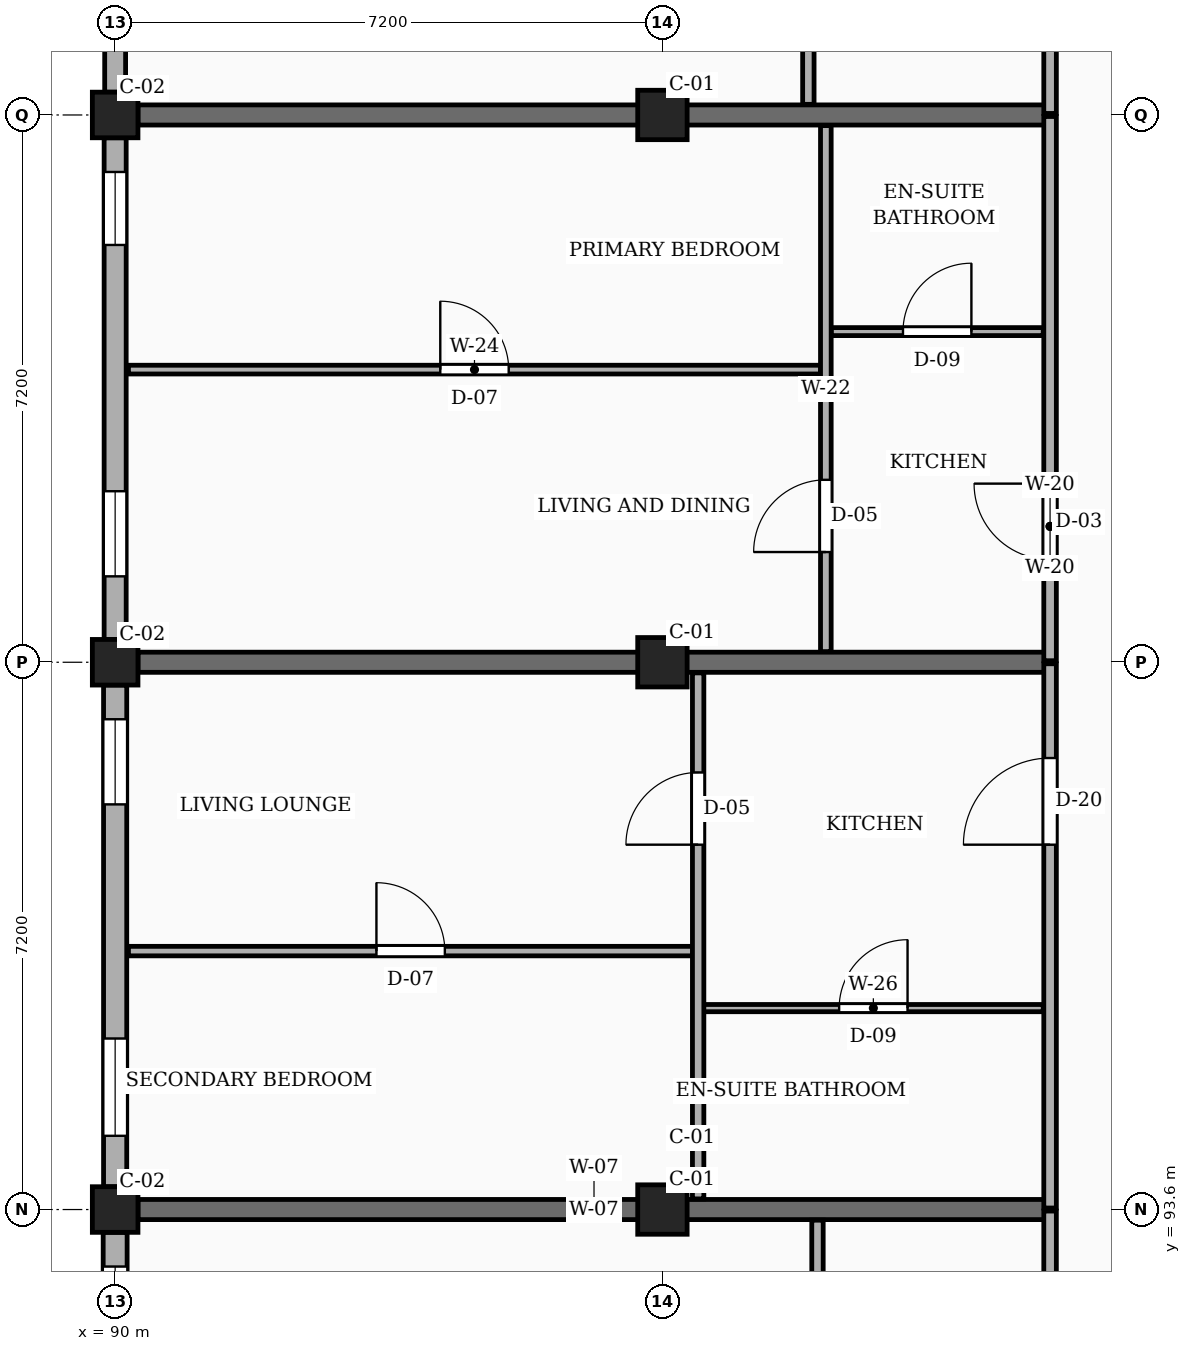
"""IFC4 building model, lengths in metres.
Left out: names, types, materials, properties, quantities, classifications, styles, units other than length and angle.
Written with IfcOpenShell. Run it as: python <this file> out.ifc"""

import sys

from ifc_helpers import new_model, si_unit, direction, frame, frame_2d, origin, origin_2d, place, context, subcontext, project, spatial, rectangle, extrude, element, fill, save


model = new_model("IFC4")
c1 = context("Model", 3, precision=1e-05, world=origin(), true_north=direction((0.0, 1.0)))
c2 = subcontext(c1, "Body", "Model", "MODEL_VIEW")
j1 = project(units=[si_unit("LENGTHUNIT", "METRE"), si_unit("PLANEANGLEUNIT", "RADIAN")], contexts=[c1])
p1 = place(None, origin())
s1 = spatial("IfcSite", under=j1, at=p1, CompositionType="ELEMENT")
p2 = place(p1, origin())
s2 = spatial("IfcBuilding", under=s1, at=p2, CompositionType="ELEMENT")
p3 = place(p2, frame((0.0, 0.0, 4.5)))
s3 = spatial("IfcBuildingStorey", under=s2, at=p3, CompositionType="ELEMENT", Elevation=4.5)
for number, where, z_axis, x_axis in (
    (1, (90.0, 93.6, 0.0), (0.0, 0.0, 1.0), (1.0, 0.0, 0.0)),
    (2, (90.0, 100.8, 0.0), (0.0, 0.0, 1.0), (1.0, 0.0, 0.0)),
    (3, (90.0, 108.0, 0.0), (0.0, 0.0, 1.0), (1.0, 0.0, 0.0)),
):
    element("IfcColumn", number, at=place(p3, frame(where, z_axis=z_axis, x_axis=x_axis)), inside=s3, PredefinedType="COLUMN", context=c2, shape_type="SweptSolid", body=[
        extrude(rectangle(XDim=0.6, YDim=0.6, at=origin_2d()), origin(), (0.0, 0.0, 1.0), 3.15),
    ])
for number, where, z_axis, x_axis in (
    (4, (97.2, 93.6, 0.0), (0.0, 0.0, 1.0), (1.0, 0.0, 0.0)),
    (5, (97.2, 100.8, 0.0), (0.0, 0.0, 1.0), (1.0, 0.0, 0.0)),
    (6, (97.2, 108.0, 0.0), (0.0, 0.0, 1.0), (1.0, 0.0, 0.0)),
):
    element("IfcColumn", number, at=place(p3, frame(where, z_axis=z_axis, x_axis=x_axis)), inside=s3, PredefinedType="COLUMN", context=c2, shape_type="SweptSolid", body=[
        extrude(rectangle(XDim=0.65, YDim=0.65, at=origin_2d()), origin(), (0.0, 0.0, 1.0), 3.15),
    ])
for number, where, z_axis, x_axis in (
    (7, (90.3, 93.6, 0.0), (0.0, 0.0, 1.0), (1.0, 0.0, 0.0)),
    (8, (90.3, 100.8, 0.0), (0.0, 0.0, 1.0), (1.0, 0.0, 0.0)),
    (9, (90.3, 108.0, 0.0), (0.0, 0.0, 1.0), (1.0, 0.0, 0.0)),
):
    element("IfcWall", number, at=place(p3, frame(where, z_axis=z_axis, x_axis=x_axis)), inside=s3, PredefinedType="SOLIDWALL", context=c2, shape_type="SweptSolid", body=[
        extrude(rectangle(XDim=12.0, YDim=0.265, at=frame_2d((6.0, 0.0))), origin(), (0.0, 0.0, 1.0), 2.19),
    ])
p4 = place(p3, frame((90.0, 114.9, 0.0), z_axis=(0.0, 0.0, 1.0), x_axis=(0.0, -1.0, 0.0)))
e10 = element("IfcWall", 10, at=p4, inside=s3, PredefinedType="SOLIDWALL", context=c2, shape_type="SweptSolid", body=[
    extrude(rectangle(XDim=6.6, YDim=0.275, at=frame_2d((3.3, 0.0))), origin(), (0.0, 0.0, 1.0), 2.46),
])
p5 = place(p4, frame((0.45, 0.0, 0.78)))
e11 = element("IfcOpeningElement", 11, at=p5, cuts=e10, PredefinedType="OPENING", context=c2, shape_type="SweptSolid", body=[
    extrude(rectangle(XDim=1.4, YDim=1.15, at=frame_2d((0.7, 0.575))), frame((0.0, 0.147, 0.0), z_axis=(0.0, -1.0, 0.0), x_axis=(1.0, 0.0, 0.0)), (0.0, 0.0, 1.0), 0.295),
])
p6 = place(p4, frame((4.65, 0.0, 0.78)))
e12 = element("IfcOpeningElement", 12, at=p6, cuts=e10, PredefinedType="OPENING", context=c2, shape_type="SweptSolid", body=[
    extrude(rectangle(XDim=0.96, YDim=1.26, at=frame_2d((0.48, 0.63))), frame((0.0, 0.147, 0.0), z_axis=(0.0, -1.0, 0.0), x_axis=(1.0, 0.0, 0.0)), (0.0, 0.0, 1.0), 0.295),
])
p7 = place(p3, frame((90.0, 107.7, 0.0), z_axis=(0.0, 0.0, 1.0), x_axis=(0.0, -1.0, 0.0)))
e13 = element("IfcWall", 13, at=p7, inside=s3, PredefinedType="SOLIDWALL", context=c2, shape_type="SweptSolid", body=[
    extrude(rectangle(XDim=6.6, YDim=0.29, at=frame_2d((3.3, 0.0))), origin(), (0.0, 0.0, 1.0), 2.46),
])
p8 = place(p7, frame((0.45, 0.0, 0.78)))
e14 = element("IfcOpeningElement", 14, at=p8, cuts=e13, PredefinedType="OPENING", context=c2, shape_type="SweptSolid", body=[
    extrude(rectangle(XDim=0.96, YDim=1.26, at=frame_2d((0.48, 0.63))), frame((0.0, 0.155, 0.0), z_axis=(0.0, -1.0, 0.0), x_axis=(1.0, 0.0, 0.0)), (0.0, 0.0, 1.0), 0.31),
])
p9 = place(p7, frame((4.65, 0.0, 0.78)))
e15 = element("IfcOpeningElement", 15, at=p9, cuts=e13, PredefinedType="OPENING", context=c2, shape_type="SweptSolid", body=[
    extrude(rectangle(XDim=1.12, YDim=1.26, at=frame_2d((0.56, 0.63))), frame((0.0, 0.155, 0.0), z_axis=(0.0, -1.0, 0.0), x_axis=(1.0, 0.0, 0.0)), (0.0, 0.0, 1.0), 0.31),
])
p10 = place(p3, frame((90.0, 100.5, 0.0), z_axis=(0.0, 0.0, 1.0), x_axis=(0.0, -1.0, 0.0)))
e16 = element("IfcWall", 16, at=p10, inside=s3, PredefinedType="SOLIDWALL", context=c2, shape_type="SweptSolid", body=[
    extrude(rectangle(XDim=6.6, YDim=0.305, at=frame_2d((3.3, 0.0))), origin(), (0.0, 0.0, 1.0), 2.46),
])
p11 = place(p10, frame((0.45, 0.0, 0.78)))
e17 = element("IfcOpeningElement", 17, at=p11, cuts=e16, PredefinedType="OPENING", context=c2, shape_type="SweptSolid", body=[
    extrude(rectangle(XDim=1.12, YDim=1.26, at=frame_2d((0.56, 0.63))), frame((0.0, 0.163, 0.0), z_axis=(0.0, -1.0, 0.0), x_axis=(1.0, 0.0, 0.0)), (0.0, 0.0, 1.0), 0.325),
])
p12 = place(p10, frame((4.65, 0.0, 0.78)))
e18 = element("IfcOpeningElement", 18, at=p12, cuts=e16, PredefinedType="OPENING", context=c2, shape_type="SweptSolid", body=[
    extrude(rectangle(XDim=1.28, YDim=1.26, at=frame_2d((0.64, 0.63))), frame((0.0, 0.163, 0.0), z_axis=(0.0, -1.0, 0.0), x_axis=(1.0, 0.0, 0.0)), (0.0, 0.0, 1.0), 0.325),
])
p13 = place(p3, frame((90.0, 93.3, 0.0), z_axis=(0.0, 0.0, 1.0), x_axis=(0.0, -1.0, 0.0)))
e19 = element("IfcWall", 19, at=p13, inside=s3, PredefinedType="SOLIDWALL", context=c2, shape_type="SweptSolid", body=[
    extrude(rectangle(XDim=6.6, YDim=0.315, at=frame_2d((3.3, 0.0))), origin(), (0.0, 0.0, 1.0), 2.46),
])
p14 = place(p13, frame((0.45, 0.0, 0.78)))
e20 = element("IfcOpeningElement", 20, at=p14, cuts=e19, PredefinedType="OPENING", context=c2, shape_type="SweptSolid", body=[
    extrude(rectangle(XDim=1.28, YDim=1.26, at=frame_2d((0.64, 0.63))), frame((0.0, 0.167, 0.0), z_axis=(0.0, -1.0, 0.0), x_axis=(1.0, 0.0, 0.0)), (0.0, 0.0, 1.0), 0.335),
])
p15 = place(p13, frame((4.65, 0.0, 0.78)))
e21 = element("IfcOpeningElement", 21, at=p15, cuts=e19, PredefinedType="OPENING", context=c2, shape_type="SweptSolid", body=[
    extrude(rectangle(XDim=1.44, YDim=1.26, at=frame_2d((0.72, 0.63))), frame((0.0, 0.167, 0.0), z_axis=(0.0, -1.0, 0.0), x_axis=(1.0, 0.0, 0.0)), (0.0, 0.0, 1.0), 0.335),
])
p16 = place(p3, frame((102.3, 86.575, 0.0), z_axis=(0.0, 0.0, 1.0), x_axis=(0.0, 1.0, 0.0)))
e22 = element("IfcWall", 22, at=p16, inside=s3, PredefinedType="PARTITIONING", context=c2, shape_type="SweptSolid", body=[
    extrude(rectangle(XDim=7.005, YDim=0.165, at=frame_2d((3.502, 0.0))), origin(), (0.0, 0.0, 1.0), 2.325),
])
p17 = place(p16, frame((4.625, 0.0, 0.0)))
e23 = element("IfcOpeningElement", 23, at=p17, cuts=e22, PredefinedType="OPENING", context=c2, shape_type="SweptSolid", body=[
    extrude(rectangle(XDim=0.94, YDim=2.12, at=frame_2d((0.47, 1.06))), frame((0.0, 0.093, 0.0), z_axis=(0.0, -1.0, 0.0), x_axis=(1.0, 0.0, 0.0)), (0.0, 0.0, 1.0), 0.185),
])
p18 = place(p3, frame((102.3, 93.62, 0.0), z_axis=(0.0, 0.0, 1.0), x_axis=(0.0, 1.0, 0.0)))
e24 = element("IfcWall", 24, at=p18, inside=s3, PredefinedType="PARTITIONING", context=c2, shape_type="SweptSolid", body=[
    extrude(rectangle(XDim=7.16, YDim=0.165, at=frame_2d((3.58, 0.0))), origin(), (0.0, 0.0, 1.0), 2.325),
])
p19 = place(p18, frame((4.78, 0.0, 0.0)))
e25 = element("IfcOpeningElement", 25, at=p19, cuts=e24, PredefinedType="OPENING", context=c2, shape_type="SweptSolid", body=[
    extrude(rectangle(XDim=1.14, YDim=2.18, at=frame_2d((0.57, 1.09))), frame((0.0, 0.093, 0.0), z_axis=(0.0, -1.0, 0.0), x_axis=(1.0, 0.0, 0.0)), (0.0, 0.0, 1.0), 0.185),
])
p20 = place(p3, frame((102.3, 100.82, 0.0), z_axis=(0.0, 0.0, 1.0), x_axis=(0.0, 1.0, 0.0)))
e26 = element("IfcWall", 26, at=p20, inside=s3, PredefinedType="PARTITIONING", context=c2, shape_type="SweptSolid", body=[
    extrude(rectangle(XDim=7.16, YDim=0.165, at=frame_2d((3.58, 0.0))), origin(), (0.0, 0.0, 1.0), 2.325),
])
p21 = place(p20, frame((1.33, 0.0, 0.0)))
e27 = element("IfcOpeningElement", 27, at=p21, cuts=e26, PredefinedType="OPENING", context=c2, shape_type="SweptSolid", body=[
    extrude(rectangle(XDim=1.0, YDim=2.15, at=frame_2d((0.5, 1.075))), frame((0.0, 0.093, 0.0), z_axis=(0.0, -1.0, 0.0), x_axis=(1.0, 0.0, 0.0)), (0.0, 0.0, 1.0), 0.185),
])
p22 = place(p3, frame((102.3, 108.02, 0.0), z_axis=(0.0, 0.0, 1.0), x_axis=(0.0, 1.0, 0.0)))
e28 = element("IfcWall", 28, at=p22, inside=s3, PredefinedType="PARTITIONING", context=c2, shape_type="SweptSolid", body=[
    extrude(rectangle(XDim=7.16, YDim=0.165, at=frame_2d((3.58, 0.0))), origin(), (0.0, 0.0, 1.0), 2.325),
])
p23 = place(p22, frame((1.33, 0.0, 0.0)))
e29 = element("IfcOpeningElement", 29, at=p23, cuts=e28, PredefinedType="OPENING", context=c2, shape_type="SweptSolid", body=[
    extrude(rectangle(XDim=0.94, YDim=2.12, at=frame_2d((0.47, 1.06))), frame((0.0, 0.093, 0.0), z_axis=(0.0, -1.0, 0.0), x_axis=(1.0, 0.0, 0.0)), (0.0, 0.0, 1.0), 0.185),
])
p24 = place(p3, frame((99.24, 86.575, 0.0), z_axis=(0.0, 0.0, 1.0), x_axis=(0.0, 1.0, 0.0)))
e30 = element("IfcWall", 30, at=p24, inside=s3, PredefinedType="PARTITIONING", context=c2, shape_type="SweptSolid", body=[
    extrude(rectangle(XDim=6.885, YDim=0.15, at=frame_2d((3.442, 0.0))), origin(), (0.0, 0.0, 1.0), 2.325),
])
p25 = place(p24, frame((4.625, 0.0, 0.0)))
e31 = element("IfcOpeningElement", 31, at=p25, cuts=e30, PredefinedType="OPENING", context=c2, shape_type="SweptSolid", body=[
    extrude(rectangle(XDim=0.92, YDim=2.1, at=frame_2d((0.46, 1.05))), frame((0.0, 0.085, 0.0), z_axis=(0.0, -1.0, 0.0), x_axis=(1.0, 0.0, 0.0)), (0.0, 0.0, 1.0), 0.17),
])
p26 = place(p3, frame((90.175, 97.0, 0.0), z_axis=(0.0, 0.0, 1.0), x_axis=(1.0, 0.0, 0.0)))
e32 = element("IfcWall", 32, at=p26, inside=s3, PredefinedType="PARTITIONING", context=c2, shape_type="SweptSolid", body=[
    extrude(rectangle(XDim=7.425, YDim=0.125, at=frame_2d((3.712, 0.0))), origin(), (0.0, 0.0, 1.0), 2.325),
])
p27 = place(p26, frame((3.262, 0.0, 0.0)))
e33 = element("IfcOpeningElement", 33, at=p27, cuts=e32, PredefinedType="OPENING", context=c2, shape_type="SweptSolid", body=[
    extrude(rectangle(XDim=0.9, YDim=2.1, at=frame_2d((0.45, 1.05))), frame((0.0, 0.073, 0.0), z_axis=(0.0, -1.0, 0.0), x_axis=(1.0, 0.0, 0.0)), (0.0, 0.0, 1.0), 0.145),
])
p28 = place(p3, frame((97.74, 96.25, 0.0), z_axis=(0.0, 0.0, 1.0), x_axis=(1.0, 0.0, 0.0)))
e34 = element("IfcWall", 34, at=p28, inside=s3, PredefinedType="PARTITIONING", context=c2, shape_type="SweptSolid", body=[
    extrude(rectangle(XDim=4.47, YDim=0.095, at=frame_2d((2.235, 0.0))), origin(), (0.0, 0.0, 1.0), 2.325),
])
p29 = place(p28, frame((1.785, 0.0, 0.0)))
e35 = element("IfcOpeningElement", 35, at=p29, cuts=e34, PredefinedType="OPENING", context=c2, shape_type="SweptSolid", body=[
    extrude(rectangle(XDim=0.9, YDim=2.05, at=frame_2d((0.45, 1.025))), frame((0.0, 0.058, 0.0), z_axis=(0.0, -1.0, 0.0), x_axis=(1.0, 0.0, 0.0)), (0.0, 0.0, 1.0), 0.115),
])
p30 = place(p3, frame((97.67, 93.74, 0.0), z_axis=(0.0, 0.0, 1.0), x_axis=(0.0, 1.0, 0.0)))
e36 = element("IfcWall", 36, at=p30, inside=s3, PredefinedType="PARTITIONING", context=c2, shape_type="SweptSolid", body=[
    extrude(rectangle(XDim=6.92, YDim=0.15, at=frame_2d((3.46, 0.0))), origin(), (0.0, 0.0, 1.0), 2.325),
])
p31 = place(p30, frame((4.66, 0.0, 0.0)))
e37 = element("IfcOpeningElement", 37, at=p31, cuts=e36, PredefinedType="OPENING", context=c2, shape_type="SweptSolid", body=[
    extrude(rectangle(XDim=0.95, YDim=2.1, at=frame_2d((0.475, 1.05))), frame((0.0, 0.085, 0.0), z_axis=(0.0, -1.0, 0.0), x_axis=(1.0, 0.0, 0.0)), (0.0, 0.0, 1.0), 0.17),
])
p32 = place(p3, frame((90.175, 104.65, 0.0), z_axis=(0.0, 0.0, 1.0), x_axis=(1.0, 0.0, 0.0)))
e38 = element("IfcWall", 38, at=p32, inside=s3, PredefinedType="PARTITIONING", context=c2, shape_type="SweptSolid", body=[
    extrude(rectangle(XDim=9.105, YDim=0.115, at=frame_2d((4.552, 0.0))), origin(), (0.0, 0.0, 1.0), 2.325),
])
p33 = place(p32, frame((4.103, 0.0, 0.0)))
e39 = element("IfcOpeningElement", 39, at=p33, cuts=e38, PredefinedType="OPENING", context=c2, shape_type="SweptSolid", body=[
    extrude(rectangle(XDim=0.9, YDim=2.1, at=frame_2d((0.45, 1.05))), frame((0.0, 0.067, 0.0), z_axis=(0.0, -1.0, 0.0), x_axis=(1.0, 0.0, 0.0)), (0.0, 0.0, 1.0), 0.135),
])
p34 = place(p3, frame((99.42, 105.15, 0.0), z_axis=(0.0, 0.0, 1.0), x_axis=(1.0, 0.0, 0.0)))
e40 = element("IfcWall", 40, at=p34, inside=s3, PredefinedType="PARTITIONING", context=c2, shape_type="SweptSolid", body=[
    extrude(rectangle(XDim=2.79, YDim=0.105, at=frame_2d((1.395, 0.0))), origin(), (0.0, 0.0, 1.0), 2.325),
])
p35 = place(p34, frame((0.945, 0.0, 0.0)))
e41 = element("IfcOpeningElement", 41, at=p35, cuts=e40, PredefinedType="OPENING", context=c2, shape_type="SweptSolid", body=[
    extrude(rectangle(XDim=0.9, YDim=2.05, at=frame_2d((0.45, 1.025))), frame((0.0, 0.062, 0.0), z_axis=(0.0, -1.0, 0.0), x_axis=(1.0, 0.0, 0.0)), (0.0, 0.0, 1.0), 0.125),
])
p36 = place(p3, frame((99.35, 100.94, 0.0), z_axis=(0.0, 0.0, 1.0), x_axis=(0.0, 1.0, 0.0)))
e42 = element("IfcWall", 42, at=p36, inside=s3, PredefinedType="PARTITIONING", context=c2, shape_type="SweptSolid", body=[
    extrude(rectangle(XDim=6.92, YDim=0.14, at=frame_2d((3.46, 0.0))), origin(), (0.0, 0.0, 1.0), 2.325),
])
p37 = place(p36, frame((1.31, 0.0, 0.0)))
e43 = element("IfcOpeningElement", 43, at=p37, cuts=e42, PredefinedType="OPENING", context=c2, shape_type="SweptSolid", body=[
    extrude(rectangle(XDim=0.95, YDim=2.1, at=frame_2d((0.475, 1.05))), frame((0.0, 0.08, 0.0), z_axis=(0.0, -1.0, 0.0), x_axis=(1.0, 0.0, 0.0)), (0.0, 0.0, 1.0), 0.16),
])
p38 = place(p3, frame((99.12, 108.14, 0.0), z_axis=(0.0, 0.0, 1.0), x_axis=(0.0, 1.0, 0.0)))
e44 = element("IfcWall", 44, at=p38, inside=s3, PredefinedType="PARTITIONING", context=c2, shape_type="SweptSolid", body=[
    extrude(rectangle(XDim=6.92, YDim=0.15, at=frame_2d((3.46, 0.0))), origin(), (0.0, 0.0, 1.0), 2.325),
])
p39 = place(p38, frame((1.31, 0.0, 0.0)))
e45 = element("IfcOpeningElement", 45, at=p39, cuts=e44, PredefinedType="OPENING", context=c2, shape_type="SweptSolid", body=[
    extrude(rectangle(XDim=0.92, YDim=2.1, at=frame_2d((0.46, 1.05))), frame((0.0, 0.085, 0.0), z_axis=(0.0, -1.0, 0.0), x_axis=(1.0, 0.0, 0.0)), (0.0, 0.0, 1.0), 0.17),
])
p40 = place(p8, origin())
e46 = element("IfcWindow", 46, at=p40, inside=s3, PartitioningType="SINGLE_PANEL", PredefinedType="WINDOW", context=c2, shape_type="SweptSolid", body=[
    extrude(rectangle(XDim=0.96, YDim=1.26, at=frame_2d((0.48, 0.63))), frame((0.0, 0.03, 0.0), z_axis=(0.0, -1.0, 0.0), x_axis=(1.0, 0.0, 0.0)), (0.0, 0.0, 1.0), 0.06),
])
fill(e14, e46)
p41 = place(p9, origin())
e47 = element("IfcWindow", 47, at=p41, inside=s3, PartitioningType="SINGLE_PANEL", PredefinedType="WINDOW", context=c2, shape_type="SweptSolid", body=[
    extrude(rectangle(XDim=1.12, YDim=1.26, at=frame_2d((0.56, 0.63))), frame((0.0, 0.03, 0.0), z_axis=(0.0, -1.0, 0.0), x_axis=(1.0, 0.0, 0.0)), (0.0, 0.0, 1.0), 0.06),
])
fill(e15, e47)
p42 = place(p11, origin())
e48 = element("IfcWindow", 48, at=p42, inside=s3, PartitioningType="SINGLE_PANEL", PredefinedType="WINDOW", context=c2, shape_type="SweptSolid", body=[
    extrude(rectangle(XDim=1.12, YDim=1.26, at=frame_2d((0.56, 0.63))), frame((0.0, 0.03, 0.0), z_axis=(0.0, -1.0, 0.0), x_axis=(1.0, 0.0, 0.0)), (0.0, 0.0, 1.0), 0.06),
])
fill(e17, e48)
p43 = place(p12, origin())
e49 = element("IfcWindow", 49, at=p43, inside=s3, PartitioningType="SINGLE_PANEL", PredefinedType="WINDOW", context=c2, shape_type="SweptSolid", body=[
    extrude(rectangle(XDim=1.28, YDim=1.26, at=frame_2d((0.64, 0.63))), frame((0.0, 0.03, 0.0), z_axis=(0.0, -1.0, 0.0), x_axis=(1.0, 0.0, 0.0)), (0.0, 0.0, 1.0), 0.06),
])
fill(e18, e49)
p44 = place(p14, origin())
e50 = element("IfcWindow", 50, at=p44, inside=s3, PartitioningType="SINGLE_PANEL", PredefinedType="WINDOW", context=c2, shape_type="SweptSolid", body=[
    extrude(rectangle(XDim=1.28, YDim=1.26, at=frame_2d((0.64, 0.63))), frame((0.0, 0.03, 0.0), z_axis=(0.0, -1.0, 0.0), x_axis=(1.0, 0.0, 0.0)), (0.0, 0.0, 1.0), 0.06),
])
fill(e20, e50)
p45 = place(p19, origin())
e51 = element("IfcDoor", 51, at=p45, inside=s3, OperationType="SINGLE_SWING_LEFT", PredefinedType="DOOR", context=c2, shape_type="SweptSolid", body=[
    extrude(rectangle(XDim=1.14, YDim=2.18, at=frame_2d((0.57, 1.09))), frame((0.0, 0.025, 0.0), z_axis=(0.0, -1.0, 0.0), x_axis=(1.0, 0.0, 0.0)), (0.0, 0.0, 1.0), 0.05),
])
fill(e25, e51)
p46 = place(p21, origin())
e52 = element("IfcDoor", 52, at=p46, inside=s3, OperationType="SINGLE_SWING_RIGHT", PredefinedType="DOOR", context=c2, shape_type="SweptSolid", body=[
    extrude(rectangle(XDim=1.0, YDim=2.15, at=frame_2d((0.5, 1.075))), frame((0.0, 0.025, 0.0), z_axis=(0.0, -1.0, 0.0), x_axis=(1.0, 0.0, 0.0)), (0.0, 0.0, 1.0), 0.05),
])
fill(e27, e52)
p47 = place(p27, origin())
e53 = element("IfcDoor", 53, at=p47, inside=s3, OperationType="SINGLE_SWING_LEFT", PredefinedType="DOOR", context=c2, shape_type="SweptSolid", body=[
    extrude(rectangle(XDim=0.9, YDim=2.1, at=frame_2d((0.45, 1.05))), frame((0.0, 0.025, 0.0), z_axis=(0.0, -1.0, 0.0), x_axis=(1.0, 0.0, 0.0)), (0.0, 0.0, 1.0), 0.05),
])
fill(e33, e53)
p48 = place(p29, origin())
e54 = element("IfcDoor", 54, at=p48, inside=s3, OperationType="SINGLE_SWING_RIGHT", PredefinedType="DOOR", context=c2, shape_type="SweptSolid", body=[
    extrude(rectangle(XDim=0.9, YDim=2.05, at=frame_2d((0.45, 1.025))), frame((0.0, 0.025, 0.0), z_axis=(0.0, -1.0, 0.0), x_axis=(1.0, 0.0, 0.0)), (0.0, 0.0, 1.0), 0.05),
])
fill(e35, e54)
p49 = place(p31, origin())
e55 = element("IfcDoor", 55, at=p49, inside=s3, OperationType="SINGLE_SWING_LEFT", PredefinedType="DOOR", context=c2, shape_type="SweptSolid", body=[
    extrude(rectangle(XDim=0.95, YDim=2.1, at=frame_2d((0.475, 1.05))), frame((0.0, 0.025, 0.0), z_axis=(0.0, -1.0, 0.0), x_axis=(1.0, 0.0, 0.0)), (0.0, 0.0, 1.0), 0.05),
])
fill(e37, e55)
p50 = place(p33, origin())
e56 = element("IfcDoor", 56, at=p50, inside=s3, OperationType="SINGLE_SWING_LEFT", PredefinedType="DOOR", context=c2, shape_type="SweptSolid", body=[
    extrude(rectangle(XDim=0.9, YDim=2.1, at=frame_2d((0.45, 1.05))), frame((0.0, 0.025, 0.0), z_axis=(0.0, -1.0, 0.0), x_axis=(1.0, 0.0, 0.0)), (0.0, 0.0, 1.0), 0.05),
])
fill(e39, e56)
p51 = place(p35, origin())
e57 = element("IfcDoor", 57, at=p51, inside=s3, OperationType="SINGLE_SWING_RIGHT", PredefinedType="DOOR", context=c2, shape_type="SweptSolid", body=[
    extrude(rectangle(XDim=0.9, YDim=2.05, at=frame_2d((0.45, 1.025))), frame((0.0, 0.025, 0.0), z_axis=(0.0, -1.0, 0.0), x_axis=(1.0, 0.0, 0.0)), (0.0, 0.0, 1.0), 0.05),
])
fill(e41, e57)
p52 = place(p37, origin())
e58 = element("IfcDoor", 58, at=p52, inside=s3, OperationType="SINGLE_SWING_LEFT", PredefinedType="DOOR", context=c2, shape_type="SweptSolid", body=[
    extrude(rectangle(XDim=0.95, YDim=2.1, at=frame_2d((0.475, 1.05))), frame((0.0, 0.025, 0.0), z_axis=(0.0, -1.0, 0.0), x_axis=(1.0, 0.0, 0.0)), (0.0, 0.0, 1.0), 0.05),
])
fill(e43, e58)
save(model, sys.argv[1])
